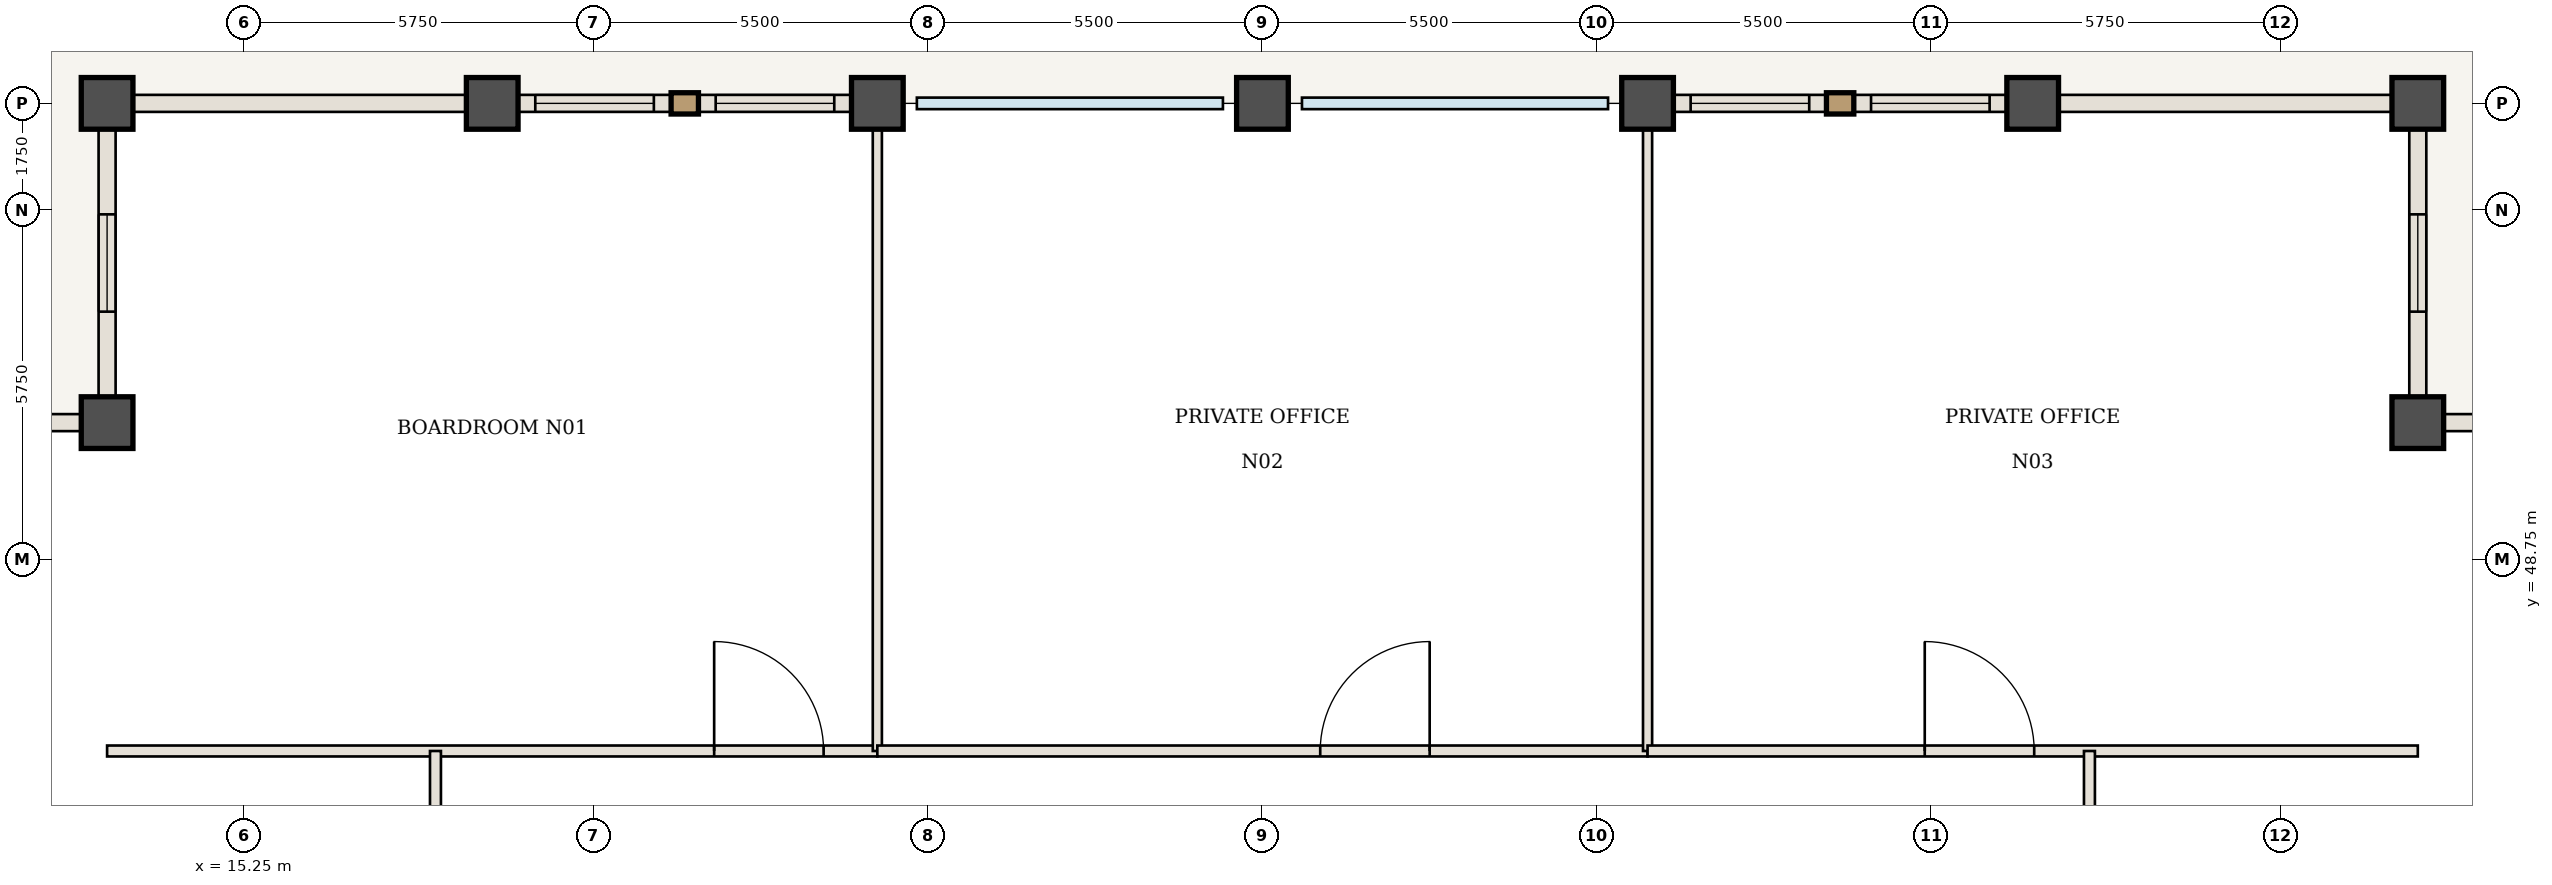
"""IFC4 building model, lengths in metres.
Left out: names, types, materials, properties, quantities, classifications, styles, units other than length and angle.
Written with IfcOpenShell. Run it as: python <this file> out.ifc"""

import sys

from ifc_helpers import new_model, si_unit, direction, frame, frame_2d, origin, origin_2d, place, context, subcontext, project, spatial, rectangle, extrude, element, fill, save


model = new_model("IFC4")
c1 = context("Model", 3, precision=1e-05, world=origin(), true_north=direction((0.0, 1.0)))
c2 = subcontext(c1, "Body", "Model", "MODEL_VIEW")
j1 = project(units=[si_unit("LENGTHUNIT", "METRE"), si_unit("PLANEANGLEUNIT", "RADIAN")], contexts=[c1])
p1 = place(None, origin())
s1 = spatial("IfcSite", under=j1, at=p1, CompositionType="ELEMENT")
p2 = place(p1, origin())
s2 = spatial("IfcBuilding", under=s1, at=p2, CompositionType="ELEMENT")
p3 = place(p2, frame((0.0, 0.0, 182.35)))
s3 = spatial("IfcBuildingStorey", under=s2, at=p3, CompositionType="ELEMENT", Elevation=182.35)
for number, where, z_axis, x_axis in (
    (1, (51.0, 51.0, -0.42), (0.0, 0.0, 1.0), (1.0, 0.0, 0.0)),
    (2, (51.0, 56.25, -0.42), (0.0, 0.0, 1.0), (1.0, 0.0, 0.0)),
    (3, (13.0, 56.25, -0.42), (0.0, 0.0, 1.0), (1.0, 0.0, 0.0)),
    (4, (13.0, 51.0, -0.42), (0.0, 0.0, 1.0), (1.0, 0.0, 0.0)),
    (5, (19.333, 56.25, -0.42), (0.0, 0.0, 1.0), (1.0, 0.0, 0.0)),
    (6, (25.667, 56.25, -0.42), (0.0, 0.0, 1.0), (1.0, 0.0, 0.0)),
    (7, (32.0, 56.25, -0.42), (0.0, 0.0, 1.0), (1.0, 0.0, 0.0)),
    (8, (38.333, 56.25, -0.42), (0.0, 0.0, 1.0), (1.0, 0.0, 0.0)),
    (9, (44.667, 56.25, -0.42), (0.0, 0.0, 1.0), (1.0, 0.0, 0.0)),
):
    element("IfcColumn", number, at=place(p3, frame(where, z_axis=z_axis, x_axis=x_axis)), inside=s3, PredefinedType="COLUMN", context=c2, shape_type="SweptSolid", body=[
        extrude(rectangle(XDim=0.85, YDim=0.85, at=origin_2d()), origin(), (0.0, 0.0, 1.0), 4.97),
    ])
p4 = place(p3, frame((13.0, 45.6, 0.0), z_axis=(0.0, 0.0, 1.0), x_axis=(1.0, 0.0, 0.0)))
e10 = element("IfcWall", 10, at=p4, inside=s3, PredefinedType="STANDARD", context=c2, shape_type="SweptSolid", body=[
    extrude(rectangle(XDim=12.667, YDim=0.18, at=frame_2d((6.333, 0.0))), origin(), (0.0, 0.0, 1.0), 4.13),
])
p5 = place(p4, frame((9.983, 0.0, 0.0)))
e11 = element("IfcOpeningElement", 11, at=p5, cuts=e10, PredefinedType="OPENING", context=c2, shape_type="SweptSolid", body=[
    extrude(rectangle(XDim=1.8, YDim=2.35, at=frame_2d((0.9, 1.175))), frame((0.0, 0.1, 0.0), z_axis=(0.0, -1.0, 0.0), x_axis=(1.0, 0.0, 0.0)), (0.0, 0.0, 1.0), 0.2),
])
p6 = place(p3, frame((25.667, 45.6, 0.0), z_axis=(0.0, 0.0, 1.0), x_axis=(0.0, 1.0, 0.0)))
e12 = element("IfcWall", 12, at=p6, inside=s3, PredefinedType="STANDARD", context=c2, shape_type="SweptSolid", body=[
    extrude(rectangle(XDim=10.59, YDim=0.15, at=frame_2d((5.295, 0.0))), origin(), (0.0, 0.0, 1.0), 4.13),
])
p7 = place(p3, frame((25.667, 45.6, 0.0), z_axis=(0.0, 0.0, 1.0), x_axis=(1.0, 0.0, 0.0)))
e13 = element("IfcWall", 13, at=p7, inside=s3, PredefinedType="STANDARD", context=c2, shape_type="SweptSolid", body=[
    extrude(rectangle(XDim=12.667, YDim=0.18, at=frame_2d((6.333, 0.0))), origin(), (0.0, 0.0, 1.0), 4.13),
])
p8 = place(p7, frame((7.283, 0.0, 0.0)))
e14 = element("IfcOpeningElement", 14, at=p8, cuts=e13, PredefinedType="OPENING", context=c2, shape_type="SweptSolid", body=[
    extrude(rectangle(XDim=1.8, YDim=2.35, at=frame_2d((0.9, 1.175))), frame((0.0, 0.1, 0.0), z_axis=(0.0, -1.0, 0.0), x_axis=(1.0, 0.0, 0.0)), (0.0, 0.0, 1.0), 0.2),
])
p9 = place(p3, frame((38.333, 45.6, 0.0), z_axis=(0.0, 0.0, 1.0), x_axis=(0.0, 1.0, 0.0)))
e15 = element("IfcWall", 15, at=p9, inside=s3, PredefinedType="STANDARD", context=c2, shape_type="SweptSolid", body=[
    extrude(rectangle(XDim=10.59, YDim=0.15, at=frame_2d((5.295, 0.0))), origin(), (0.0, 0.0, 1.0), 4.13),
])
p10 = place(p3, frame((38.333, 45.6, 0.0), z_axis=(0.0, 0.0, 1.0), x_axis=(1.0, 0.0, 0.0)))
e16 = element("IfcWall", 16, at=p10, inside=s3, PredefinedType="STANDARD", context=c2, shape_type="SweptSolid", body=[
    extrude(rectangle(XDim=12.667, YDim=0.18, at=frame_2d((6.333, 0.0))), origin(), (0.0, 0.0, 1.0), 4.13),
])
p11 = place(p10, frame((4.558, 0.0, 0.0)))
e17 = element("IfcOpeningElement", 17, at=p11, cuts=e16, PredefinedType="OPENING", context=c2, shape_type="SweptSolid", body=[
    extrude(rectangle(XDim=1.8, YDim=2.35, at=frame_2d((0.9, 1.175))), frame((0.0, 0.1, 0.0), z_axis=(0.0, -1.0, 0.0), x_axis=(1.0, 0.0, 0.0)), (0.0, 0.0, 1.0), 0.2),
])
p12 = place(p3, frame((18.4, 38.333, 0.0), z_axis=(0.0, 0.0, 1.0), x_axis=(0.0, 1.0, 0.0)))
e18 = element("IfcWall", 18, at=p12, inside=s3, PredefinedType="STANDARD", context=c2, shape_type="SweptSolid", body=[
    extrude(rectangle(XDim=7.267, YDim=0.18, at=frame_2d((3.633, 0.0))), origin(), (0.0, 0.0, 1.0), 4.13),
])
p13 = place(p12, frame((3.133, 0.0, 0.0)))
e19 = element("IfcOpeningElement", 19, at=p13, cuts=e18, PredefinedType="OPENING", context=c2, shape_type="SweptSolid", body=[
    extrude(rectangle(XDim=1.8, YDim=2.35, at=frame_2d((0.9, 1.175))), frame((0.0, 0.1, 0.0), z_axis=(0.0, -1.0, 0.0), x_axis=(1.0, 0.0, 0.0)), (0.0, 0.0, 1.0), 0.2),
])
p14 = place(p3, frame((45.6, 31.8, 0.0), z_axis=(0.0, 0.0, 1.0), x_axis=(0.0, 1.0, 0.0)))
e20 = element("IfcWall", 20, at=p14, inside=s3, PredefinedType="STANDARD", context=c2, shape_type="SweptSolid", body=[
    extrude(rectangle(XDim=13.8, YDim=0.18, at=frame_2d((6.9, 0.0))), origin(), (0.0, 0.0, 1.0), 4.13),
])
p15 = place(p14, frame((6.4, 0.0, 0.0)))
e21 = element("IfcOpeningElement", 21, at=p15, cuts=e20, PredefinedType="OPENING", context=c2, shape_type="SweptSolid", body=[
    extrude(rectangle(XDim=0.98, YDim=2.2, at=frame_2d((0.49, 1.1))), frame((0.0, 0.1, 0.0), z_axis=(0.0, -1.0, 0.0), x_axis=(1.0, 0.0, 0.0)), (0.0, 0.0, 1.0), 0.2),
])
p16 = place(p3, frame((13.0, 56.25, 0.0), z_axis=(0.0, 0.0, 1.0), x_axis=(1.0, 0.0, 0.0)))
e22 = element("IfcWall", 22, at=p16, inside=s3, PredefinedType="USERDEFINED", context=c2, shape_type="SweptSolid", body=[
    extrude(rectangle(XDim=6.333, YDim=0.28, at=frame_2d((3.167, 0.0))), origin(), (0.0, 0.0, 1.0), 3.43),
])
p17 = place(p3, frame((19.333, 56.25, 0.0), z_axis=(0.0, 0.0, 1.0), x_axis=(1.0, 0.0, 0.0)))
e23 = element("IfcWall", 23, at=p17, inside=s3, PredefinedType="USERDEFINED", context=c2, shape_type="SweptSolid", body=[
    extrude(rectangle(XDim=6.333, YDim=0.28, at=frame_2d((3.167, 0.0))), origin(), (0.0, 0.0, 1.0), 3.43),
])
p18 = place(p17, frame((0.708, 0.0, 0.85)))
e24 = element("IfcOpeningElement", 24, at=p18, cuts=e23, PredefinedType="OPENING", context=c2, shape_type="SweptSolid", body=[
    extrude(rectangle(XDim=1.95, YDim=2.2, at=frame_2d((0.975, 1.1))), frame((0.0, 0.15, 0.0), z_axis=(0.0, -1.0, 0.0), x_axis=(1.0, 0.0, 0.0)), (0.0, 0.0, 1.0), 0.3),
])
p19 = place(p17, frame((3.675, 0.0, 0.85)))
e25 = element("IfcOpeningElement", 25, at=p19, cuts=e23, PredefinedType="OPENING", context=c2, shape_type="SweptSolid", body=[
    extrude(rectangle(XDim=1.95, YDim=2.2, at=frame_2d((0.975, 1.1))), frame((0.0, 0.15, 0.0), z_axis=(0.0, -1.0, 0.0), x_axis=(1.0, 0.0, 0.0)), (0.0, 0.0, 1.0), 0.3),
])
p20 = place(p3, frame((38.333, 56.25, 0.0), z_axis=(0.0, 0.0, 1.0), x_axis=(1.0, 0.0, 0.0)))
e26 = element("IfcWall", 26, at=p20, inside=s3, PredefinedType="USERDEFINED", context=c2, shape_type="SweptSolid", body=[
    extrude(rectangle(XDim=6.333, YDim=0.28, at=frame_2d((3.167, 0.0))), origin(), (0.0, 0.0, 1.0), 3.43),
])
p21 = place(p20, frame((0.708, 0.0, 0.85)))
e27 = element("IfcOpeningElement", 27, at=p21, cuts=e26, PredefinedType="OPENING", context=c2, shape_type="SweptSolid", body=[
    extrude(rectangle(XDim=1.95, YDim=2.2, at=frame_2d((0.975, 1.1))), frame((0.0, 0.15, 0.0), z_axis=(0.0, -1.0, 0.0), x_axis=(1.0, 0.0, 0.0)), (0.0, 0.0, 1.0), 0.3),
])
p22 = place(p20, frame((3.675, 0.0, 0.85)))
e28 = element("IfcOpeningElement", 28, at=p22, cuts=e26, PredefinedType="OPENING", context=c2, shape_type="SweptSolid", body=[
    extrude(rectangle(XDim=1.95, YDim=2.2, at=frame_2d((0.975, 1.1))), frame((0.0, 0.15, 0.0), z_axis=(0.0, -1.0, 0.0), x_axis=(1.0, 0.0, 0.0)), (0.0, 0.0, 1.0), 0.3),
])
p23 = place(p3, frame((44.667, 56.25, 0.0), z_axis=(0.0, 0.0, 1.0), x_axis=(1.0, 0.0, 0.0)))
e29 = element("IfcWall", 29, at=p23, inside=s3, PredefinedType="USERDEFINED", context=c2, shape_type="SweptSolid", body=[
    extrude(rectangle(XDim=6.333, YDim=0.28, at=frame_2d((3.167, 0.0))), origin(), (0.0, 0.0, 1.0), 3.43),
])
p24 = place(p3, frame((51.0, 51.0, 0.0), z_axis=(0.0, 0.0, 1.0), x_axis=(1.0, 0.0, 0.0)))
e30 = element("IfcWall", 30, at=p24, inside=s3, PredefinedType="USERDEFINED", context=c2, shape_type="SweptSolid", body=[
    extrude(rectangle(XDim=5.25, YDim=0.28, at=frame_2d((2.625, 0.0))), origin(), (0.0, 0.0, 1.0), 3.43),
])
p25 = place(p24, frame((1.825, 0.0, 0.85)))
e31 = element("IfcOpeningElement", 31, at=p25, cuts=e30, PredefinedType="OPENING", context=c2, shape_type="SweptSolid", body=[
    extrude(rectangle(XDim=1.6, YDim=2.05, at=frame_2d((0.8, 1.025))), frame((0.0, 0.15, 0.0), z_axis=(0.0, -1.0, 0.0), x_axis=(1.0, 0.0, 0.0)), (0.0, 0.0, 1.0), 0.3),
])
p26 = place(p3, frame((51.0, 56.25, 0.0), z_axis=(0.0, 0.0, 1.0), x_axis=(0.0, -1.0, 0.0)))
e32 = element("IfcWall", 32, at=p26, inside=s3, PredefinedType="USERDEFINED", context=c2, shape_type="SweptSolid", body=[
    extrude(rectangle(XDim=5.25, YDim=0.28, at=frame_2d((2.625, 0.0))), origin(), (0.0, 0.0, 1.0), 3.43),
])
p27 = place(p26, frame((1.825, 0.0, 0.85)))
e33 = element("IfcOpeningElement", 33, at=p27, cuts=e32, PredefinedType="OPENING", context=c2, shape_type="SweptSolid", body=[
    extrude(rectangle(XDim=1.6, YDim=2.05, at=frame_2d((0.8, 1.025))), frame((0.0, 0.15, 0.0), z_axis=(0.0, -1.0, 0.0), x_axis=(1.0, 0.0, 0.0)), (0.0, 0.0, 1.0), 0.3),
])
p28 = place(p3, frame((13.0, 51.0, 0.0), z_axis=(0.0, 0.0, 1.0), x_axis=(0.0, 1.0, 0.0)))
e34 = element("IfcWall", 34, at=p28, inside=s3, PredefinedType="USERDEFINED", context=c2, shape_type="SweptSolid", body=[
    extrude(rectangle(XDim=5.25, YDim=0.28, at=frame_2d((2.625, 0.0))), origin(), (0.0, 0.0, 1.0), 3.43),
])
p29 = place(p28, frame((1.825, 0.0, 0.85)))
e35 = element("IfcOpeningElement", 35, at=p29, cuts=e34, PredefinedType="OPENING", context=c2, shape_type="SweptSolid", body=[
    extrude(rectangle(XDim=1.6, YDim=2.05, at=frame_2d((0.8, 1.025))), frame((0.0, 0.15, 0.0), z_axis=(0.0, -1.0, 0.0), x_axis=(1.0, 0.0, 0.0)), (0.0, 0.0, 1.0), 0.3),
])
p30 = place(p3, frame((7.75, 51.0, 0.0), z_axis=(0.0, 0.0, 1.0), x_axis=(1.0, 0.0, 0.0)))
e36 = element("IfcWall", 36, at=p30, inside=s3, PredefinedType="USERDEFINED", context=c2, shape_type="SweptSolid", body=[
    extrude(rectangle(XDim=5.25, YDim=0.28, at=frame_2d((2.625, 0.0))), origin(), (0.0, 0.0, 1.0), 3.43),
])
p31 = place(p30, frame((1.825, 0.0, 0.85)))
e37 = element("IfcOpeningElement", 37, at=p31, cuts=e36, PredefinedType="OPENING", context=c2, shape_type="SweptSolid", body=[
    extrude(rectangle(XDim=1.6, YDim=2.05, at=frame_2d((0.8, 1.025))), frame((0.0, 0.15, 0.0), z_axis=(0.0, -1.0, 0.0), x_axis=(1.0, 0.0, 0.0)), (0.0, 0.0, 1.0), 0.3),
])
p32 = place(p5, origin())
e38 = element("IfcDoor", 38, at=p32, inside=s3, OperationType="SINGLE_SWING_LEFT", PredefinedType="DOOR", context=c2, shape_type="SweptSolid", body=[
    extrude(rectangle(XDim=1.8, YDim=2.35, at=frame_2d((0.9, 1.175))), frame((0.0, 0.025, 0.0), z_axis=(0.0, -1.0, 0.0), x_axis=(1.0, 0.0, 0.0)), (0.0, 0.0, 1.0), 0.05),
])
fill(e11, e38)
p33 = place(p8, origin())
e39 = element("IfcDoor", 39, at=p33, inside=s3, OperationType="SINGLE_SWING_RIGHT", PredefinedType="DOOR", context=c2, shape_type="SweptSolid", body=[
    extrude(rectangle(XDim=1.8, YDim=2.35, at=frame_2d((0.9, 1.175))), frame((0.0, 0.025, 0.0), z_axis=(0.0, -1.0, 0.0), x_axis=(1.0, 0.0, 0.0)), (0.0, 0.0, 1.0), 0.05),
])
fill(e14, e39)
p34 = place(p11, origin())
e40 = element("IfcDoor", 40, at=p34, inside=s3, OperationType="SINGLE_SWING_LEFT", PredefinedType="DOOR", context=c2, shape_type="SweptSolid", body=[
    extrude(rectangle(XDim=1.8, YDim=2.35, at=frame_2d((0.9, 1.175))), frame((0.0, 0.025, 0.0), z_axis=(0.0, -1.0, 0.0), x_axis=(1.0, 0.0, 0.0)), (0.0, 0.0, 1.0), 0.05),
])
fill(e17, e40)
p35 = place(p18, origin())
e41 = element("IfcWindow", 41, at=p35, inside=s3, PartitioningType="SINGLE_PANEL", PredefinedType="WINDOW", context=c2, shape_type="SweptSolid", body=[
    extrude(rectangle(XDim=1.95, YDim=2.2, at=frame_2d((0.975, 1.1))), frame((0.0, 0.03, 0.0), z_axis=(0.0, -1.0, 0.0), x_axis=(1.0, 0.0, 0.0)), (0.0, 0.0, 1.0), 0.06),
])
fill(e24, e41)
p36 = place(p19, origin())
e42 = element("IfcWindow", 42, at=p36, inside=s3, PartitioningType="SINGLE_PANEL", PredefinedType="WINDOW", context=c2, shape_type="SweptSolid", body=[
    extrude(rectangle(XDim=1.95, YDim=2.2, at=frame_2d((0.975, 1.1))), frame((0.0, 0.03, 0.0), z_axis=(0.0, -1.0, 0.0), x_axis=(1.0, 0.0, 0.0)), (0.0, 0.0, 1.0), 0.06),
])
fill(e25, e42)
p37 = place(p21, origin())
e43 = element("IfcWindow", 43, at=p37, inside=s3, PartitioningType="SINGLE_PANEL", PredefinedType="WINDOW", context=c2, shape_type="SweptSolid", body=[
    extrude(rectangle(XDim=1.95, YDim=2.2, at=frame_2d((0.975, 1.1))), frame((0.0, 0.03, 0.0), z_axis=(0.0, -1.0, 0.0), x_axis=(1.0, 0.0, 0.0)), (0.0, 0.0, 1.0), 0.06),
])
fill(e27, e43)
p38 = place(p22, origin())
e44 = element("IfcWindow", 44, at=p38, inside=s3, PartitioningType="SINGLE_PANEL", PredefinedType="WINDOW", context=c2, shape_type="SweptSolid", body=[
    extrude(rectangle(XDim=1.95, YDim=2.2, at=frame_2d((0.975, 1.1))), frame((0.0, 0.03, 0.0), z_axis=(0.0, -1.0, 0.0), x_axis=(1.0, 0.0, 0.0)), (0.0, 0.0, 1.0), 0.06),
])
fill(e28, e44)
p39 = place(p27, origin())
e45 = element("IfcWindow", 45, at=p39, inside=s3, PartitioningType="SINGLE_PANEL", PredefinedType="WINDOW", context=c2, shape_type="SweptSolid", body=[
    extrude(rectangle(XDim=1.6, YDim=2.05, at=frame_2d((0.8, 1.025))), frame((0.0, 0.03, 0.0), z_axis=(0.0, -1.0, 0.0), x_axis=(1.0, 0.0, 0.0)), (0.0, 0.0, 1.0), 0.06),
])
fill(e33, e45)
p40 = place(p29, origin())
e46 = element("IfcWindow", 46, at=p40, inside=s3, PartitioningType="SINGLE_PANEL", PredefinedType="WINDOW", context=c2, shape_type="SweptSolid", body=[
    extrude(rectangle(XDim=1.6, YDim=2.05, at=frame_2d((0.8, 1.025))), frame((0.0, 0.03, 0.0), z_axis=(0.0, -1.0, 0.0), x_axis=(1.0, 0.0, 0.0)), (0.0, 0.0, 1.0), 0.06),
])
fill(e35, e46)
save(model, sys.argv[1])
